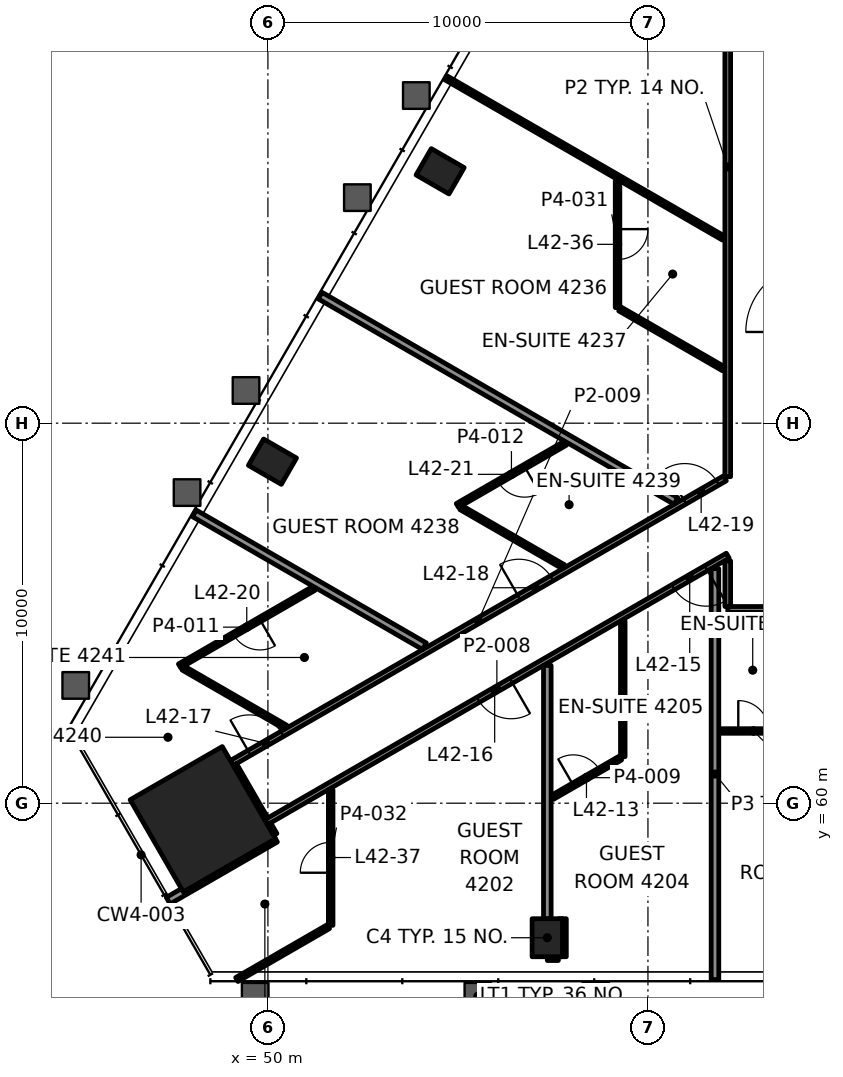
"""IFC4 building model, lengths in metres.
Left out: names, types, materials, properties, quantities, classifications, styles, units other than length and angle.
Written with IfcOpenShell. Run it as: python <this file> out.ifc"""

import sys

from ifc_helpers import new_model, si_unit, direction, frame, frame_2d, origin, origin_2d, place, context, subcontext, project, spatial, rectangle, hollow_rectangle, extrude, element, fill, save


model = new_model("IFC4")
c1 = context("Model", 3, precision=1e-05, world=origin(), true_north=direction((0.0, 1.0)))
c2 = subcontext(c1, "Body", "Model", "MODEL_VIEW")
j1 = project(units=[si_unit("LENGTHUNIT", "METRE"), si_unit("PLANEANGLEUNIT", "RADIAN")], contexts=[c1])
p1 = place(None, origin())
s1 = spatial("IfcSite", under=j1, at=p1, CompositionType="ELEMENT")
p2 = place(p1, origin())
s2 = spatial("IfcBuilding", under=s1, at=p2, CompositionType="ELEMENT")
p3 = place(p2, frame((0.0, 0.0, 183.1)))
s3 = spatial("IfcBuildingStorey", under=s2, at=p3, CompositionType="ELEMENT", Elevation=183.1)
p4 = place(p3, frame((48.287, 59.577, 0.0), z_axis=(0.0, 0.0, 1.0), x_axis=(0.5, -0.866025403784, 0.0)))
e1 = element("IfcColumn", 1, at=p4, inside=s3, PredefinedType="COLUMN", context=c2, shape_type="SweptSolid", body=[
    extrude(rectangle(XDim=2.8, YDim=2.8, at=origin_2d()), origin(), (0.0, 0.0, 1.0), 3.9),
])
for number, where, z_axis, x_axis in (
    (2, (57.352, 56.46, -0.0), (0.0, 0.0, 1.0), (1.0, 0.0, 0.0)),
    (3, (54.532, 76.628, -0.0), (0.0, 0.0, 1.0), (-0.5, -0.866, 0.0)),
    (4, (50.12, 68.987, -0.0), (0.0, 0.0, 1.0), (-0.5, -0.866, 0.0)),
):
    element("IfcColumn", number, at=place(p3, frame(where, z_axis=z_axis, x_axis=x_axis)), inside=s3, PredefinedType="COLUMN", context=c2, shape_type="SweptSolid", body=[
        extrude(hollow_rectangle(XDim=0.8, YDim=1.0, WallThickness=0.05, at=origin_2d()), origin(), (0.0, 0.0, 1.0), 3.9),
    ])
p5 = place(p3, frame((57.352, 55.96, 0.0), z_axis=(0.0, 0.0, 1.0), x_axis=(1.0, 0.0, 0.0)))
e5 = element("IfcWall", 5, at=p5, inside=s3, PredefinedType="PARTITIONING", context=c2, shape_type="SweptSolid", body=[
    extrude(rectangle(XDim=0.29, YDim=0.2, at=frame_2d((0.145, 0.0))), origin(), (0.0, 0.0, 1.0), 3.1),
])
p6 = place(p3, frame((61.864, 61.9, 0.0), z_axis=(0.0, 0.0, 1.0), x_axis=(1.0, 0.0, 0.0)))
e6 = element("IfcWall", 6, at=p6, inside=s3, PredefinedType="PARTITIONING", context=c2, shape_type="SweptSolid", body=[
    extrude(rectangle(XDim=1.825, YDim=0.12, at=frame_2d((0.913, 0.0))), origin(), (0.0, 0.0, 1.0), 3.1),
])
p7 = place(p6, frame((0.513, 0.0, 0.0)))
e7 = element("IfcOpeningElement", 7, at=p7, cuts=e6, PredefinedType="OPENING", context=c2, shape_type="SweptSolid", body=[
    extrude(rectangle(XDim=0.8, YDim=2.1, at=frame_2d((0.4, 1.05))), frame((0.0, 0.07, 0.0), z_axis=(0.0, -1.0, 0.0), x_axis=(1.0, 0.0, 0.0)), (0.0, 0.0, 1.0), 0.14),
])
p8 = place(p3, frame((87.9, 65.1, 0.0), z_axis=(0.0, 0.0, 1.0), x_axis=(-1.0, 0.0, 0.0)))
e8 = element("IfcWall", 8, at=p8, inside=s3, PredefinedType="PARTITIONING", context=c2, shape_type="SweptSolid", body=[
    extrude(rectangle(XDim=25.8, YDim=0.15, at=frame_2d((12.9, 0.0))), origin(), (0.0, 0.0, 1.0), 3.1),
])
p9 = place(p8, frame((2.264, 0.0, 0.0)))
e9 = element("IfcOpeningElement", 9, at=p9, cuts=e8, PredefinedType="OPENING", context=c2, shape_type="SweptSolid", body=[
    extrude(rectangle(XDim=1.0, YDim=2.1, at=frame_2d((0.5, 1.05))), frame((0.0, 0.085, 0.0), z_axis=(0.0, -1.0, 0.0), x_axis=(1.0, 0.0, 0.0)), (0.0, 0.0, 1.0), 0.17),
])
p10 = place(p8, frame((10.244, 0.0, 0.0)))
e10 = element("IfcOpeningElement", 10, at=p10, cuts=e8, PredefinedType="OPENING", context=c2, shape_type="SweptSolid", body=[
    extrude(rectangle(XDim=0.9, YDim=2.1, at=frame_2d((0.45, 1.05))), frame((0.0, 0.085, 0.0), z_axis=(0.0, -1.0, 0.0), x_axis=(1.0, 0.0, 0.0)), (0.0, 0.0, 1.0), 0.17),
])
p11 = place(p8, frame((18.135, 0.0, 0.0)))
e11 = element("IfcOpeningElement", 11, at=p11, cuts=e8, PredefinedType="OPENING", context=c2, shape_type="SweptSolid", body=[
    extrude(rectangle(XDim=1.0, YDim=2.1, at=frame_2d((0.5, 1.05))), frame((0.0, 0.085, 0.0), z_axis=(0.0, -1.0, 0.0), x_axis=(1.0, 0.0, 0.0)), (0.0, 0.0, 1.0), 0.17),
])
p12 = place(p8, frame((21.936, 0.0, 0.0)))
e12 = element("IfcOpeningElement", 12, at=p12, cuts=e8, PredefinedType="OPENING", context=c2, shape_type="SweptSolid", body=[
    extrude(rectangle(XDim=1.0, YDim=2.1, at=frame_2d((0.5, 1.05))), frame((0.0, 0.085, 0.0), z_axis=(0.0, -1.0, 0.0), x_axis=(1.0, 0.0, 0.0)), (0.0, 0.0, 1.0), 0.17),
])
p13 = place(p3, frame((49.182, 55.36, 0.0), z_axis=(0.0, 0.0, 1.0), x_axis=(0.86601027972, 0.500026194733, 0.0)))
e13 = element("IfcWall", 13, at=p13, inside=s3, PredefinedType="PARTITIONING", context=c2, shape_type="SweptSolid", body=[
    extrude(rectangle(XDim=2.783, YDim=0.12, at=frame_2d((1.392, 0.0))), origin(), (0.0, 0.0, 1.0), 3.1),
])
p14 = place(p3, frame((57.487, 60.155, 0.0), z_axis=(0.0, 0.0, 1.0), x_axis=(0.866018462269, 0.500012022864, 0.0)))
e14 = element("IfcWall", 14, at=p14, inside=s3, PredefinedType="PARTITIONING", context=c2, shape_type="SweptSolid", body=[
    extrude(rectangle(XDim=2.068, YDim=0.12, at=frame_2d((1.034, 0.0))), origin(), (0.0, 0.0, 1.0), 3.1),
])
p15 = place(p14, frame((0.634, 0.0, 0.0)))
e15 = element("IfcOpeningElement", 15, at=p15, cuts=e14, PredefinedType="OPENING", context=c2, shape_type="SweptSolid", body=[
    extrude(rectangle(XDim=0.8, YDim=2.1, at=frame_2d((0.4, 1.05))), frame((0.0, 0.07, 0.0), z_axis=(0.0, -1.0, 0.0), x_axis=(1.0, 0.0, 0.0)), (0.0, 0.0, 1.0), 0.14),
])
p16 = place(p3, frame((47.376, 57.435, 0.0), z_axis=(0.0, 0.0, 1.0), x_axis=(0.866035906198, 0.499981808845, 0.0)))
e16 = element("IfcWall", 16, at=p16, inside=s3, PredefinedType="PARTITIONING", context=c2, shape_type="SweptSolid", body=[
    extrude(rectangle(XDim=3.259, YDim=0.2, at=frame_2d((1.63, 0.0))), origin(), (0.0, 0.0, 1.0), 3.1),
])
p17 = place(p3, frame((62.1, 66.513, 0.0), z_axis=(0.0, 0.0, 1.0), x_axis=(-0.866025334814, -0.500000119461, 0.0)))
e17 = element("IfcWall", 17, at=p17, inside=s3, PredefinedType="PARTITIONING", context=c2, shape_type="SweptSolid", body=[
    extrude(rectangle(XDim=14.03, YDim=0.15, at=frame_2d((7.015, 0.0))), origin(), (0.0, 0.0, 1.0), 2.947),
])
p18 = place(p17, frame((0.656, 0.0, 0.0)))
e18 = element("IfcOpeningElement", 18, at=p18, cuts=e17, PredefinedType="OPENING", context=c2, shape_type="SweptSolid", body=[
    extrude(rectangle(XDim=1.0, YDim=2.1, at=frame_2d((0.5, 1.05))), frame((0.0, 0.085, 0.0), z_axis=(0.0, -1.0, 0.0), x_axis=(1.0, 0.0, 0.0)), (0.0, 0.0, 1.0), 0.17),
])
p19 = place(p17, frame((6.582, 0.0, 0.0)))
e19 = element("IfcOpeningElement", 19, at=p19, cuts=e17, PredefinedType="OPENING", context=c2, shape_type="SweptSolid", body=[
    extrude(rectangle(XDim=1.0, YDim=2.1, at=frame_2d((0.5, 1.05))), frame((0.0, 0.085, 0.0), z_axis=(0.0, -1.0, 0.0), x_axis=(1.0, 0.0, 0.0)), (0.0, 0.0, 1.0), 0.17),
])
p20 = place(p3, frame((49.05, 61.057, 0.0), z_axis=(0.0, 0.0, 1.0), x_axis=(0.866027379905, 0.499996577244, 0.0)))
e20 = element("IfcWall", 20, at=p20, inside=s3, PredefinedType="PARTITIONING", context=c2, shape_type="SweptSolid", body=[
    extrude(rectangle(XDim=14.982, YDim=0.15, at=frame_2d((7.491, 0.0))), origin(), (0.0, 0.0, 1.0), 3.1),
])
p21 = place(p20, frame((0.532, 0.0, 0.0)))
e21 = element("IfcOpeningElement", 21, at=p21, cuts=e20, PredefinedType="OPENING", context=c2, shape_type="SweptSolid", body=[
    extrude(rectangle(XDim=1.0, YDim=2.1, at=frame_2d((0.5, 1.05))), frame((0.0, 0.085, 0.0), z_axis=(0.0, -1.0, 0.0), x_axis=(1.0, 0.0, 0.0)), (0.0, 0.0, 1.0), 0.17),
])
p22 = place(p20, frame((8.725, 0.0, 0.0)))
e22 = element("IfcOpeningElement", 22, at=p22, cuts=e20, PredefinedType="OPENING", context=c2, shape_type="SweptSolid", body=[
    extrude(rectangle(XDim=1.0, YDim=2.1, at=frame_2d((0.5, 1.05))), frame((0.0, 0.085, 0.0), z_axis=(0.0, -1.0, 0.0), x_axis=(1.0, 0.0, 0.0)), (0.0, 0.0, 1.0), 0.17),
])
p23 = place(p20, frame((13.76, 0.0, 0.0)))
e23 = element("IfcOpeningElement", 23, at=p23, cuts=e20, PredefinedType="OPENING", context=c2, shape_type="SweptSolid", body=[
    extrude(rectangle(XDim=1.0, YDim=2.1, at=frame_2d((0.5, 1.05))), frame((0.0, 0.085, 0.0), z_axis=(0.0, -1.0, 0.0), x_axis=(1.0, 0.0, 0.0)), (0.0, 0.0, 1.0), 0.17),
])
p24 = place(p3, frame((51.212, 65.654, 0.0), z_axis=(0.0, 0.0, 1.0), x_axis=(-0.866038243659, -0.499977760025, 0.0)))
e24 = element("IfcWall", 24, at=p24, inside=s3, PredefinedType="PARTITIONING", context=c2, shape_type="SweptSolid", body=[
    extrude(rectangle(XDim=4.084, YDim=0.12, at=frame_2d((2.042, 0.0))), origin(), (0.0, 0.0, 1.0), 3.1),
])
p25 = place(p24, frame((1.642, 0.0, 0.0)))
e25 = element("IfcOpeningElement", 25, at=p25, cuts=e24, PredefinedType="OPENING", context=c2, shape_type="SweptSolid", body=[
    extrude(rectangle(XDim=0.8, YDim=2.1, at=frame_2d((0.4, 1.05))), frame((0.0, 0.07, 0.0), z_axis=(0.0, -1.0, 0.0), x_axis=(1.0, 0.0, 0.0)), (0.0, 0.0, 1.0), 0.14),
])
p26 = place(p3, frame((57.83, 69.475, 0.0), z_axis=(0.0, 0.0, 1.0), x_axis=(-0.866038236991, -0.499977771575, 0.0)))
e26 = element("IfcWall", 26, at=p26, inside=s3, PredefinedType="PARTITIONING", context=c2, shape_type="SweptSolid", body=[
    extrude(rectangle(XDim=3.283, YDim=0.12, at=frame_2d((1.642, 0.0))), origin(), (0.0, 0.0, 1.0), 3.1),
])
p27 = place(p26, frame((1.242, 0.0, 0.0)))
e27 = element("IfcOpeningElement", 27, at=p27, cuts=e26, PredefinedType="OPENING", context=c2, shape_type="SweptSolid", body=[
    extrude(rectangle(XDim=0.8, YDim=2.1, at=frame_2d((0.4, 1.05))), frame((0.0, 0.07, 0.0), z_axis=(0.0, -1.0, 0.0), x_axis=(1.0, 0.0, 0.0)), (0.0, 0.0, 1.0), 0.14),
])
p28 = place(p3, frame((62.1, 65.175, 0.0), z_axis=(0.0, 0.0, 1.0), x_axis=(0.0, 1.0, 0.0)))
e28 = element("IfcWall", 28, at=p28, inside=s3, PredefinedType="PARTITIONING", context=c2, shape_type="SweptSolid", body=[
    extrude(rectangle(XDim=1.201, YDim=0.15, at=frame_2d((0.601, 0.0))), origin(), (0.0, 0.0, 1.0), 2.947),
])
p29 = place(p3, frame((62.1, 68.591, 0.0), z_axis=(0.0, 0.0, 1.0), x_axis=(0.0, 1.0, 0.0)))
e29 = element("IfcWall", 29, at=p29, inside=s3, PredefinedType="PARTITIONING", context=c2, shape_type="SweptSolid", body=[
    extrude(rectangle(XDim=16.308, YDim=0.15, at=frame_2d((8.154, 0.0))), origin(), (0.0, 0.0, 1.0), 3.1),
])
p30 = place(p3, frame((61.764, 55.36, 0.0), z_axis=(0.0, 0.0, 1.0), x_axis=(0.0, 1.0, 0.0)))
e30 = element("IfcWall", 30, at=p30, inside=s3, PredefinedType="PARTITIONING", context=c2, shape_type="SweptSolid", body=[
    extrude(rectangle(XDim=10.813, YDim=0.2, at=frame_2d((5.406, 0.0))), origin(), (0.0, 0.0, 1.0), 2.947),
])
p31 = place(p3, frame((59.338, 61.223, 0.0), z_axis=(0.0, 0.0, 1.0), x_axis=(0.0, 1.0, 0.0)))
e31 = element("IfcWall", 31, at=p31, inside=s3, PredefinedType="PARTITIONING", context=c2, shape_type="SweptSolid", body=[
    extrude(rectangle(XDim=3.568, YDim=0.12, at=frame_2d((1.784, 0.0))), origin(), (0.0, 0.0, 1.0), 2.947),
])
p32 = place(p3, frame((59.2, 76.371, 0.0), z_axis=(0.0, 0.0, 1.0), x_axis=(0.0, -1.0, 0.0)))
e32 = element("IfcWall", 32, at=p32, inside=s3, PredefinedType="PARTITIONING", context=c2, shape_type="SweptSolid", body=[
    extrude(rectangle(XDim=3.329, YDim=0.12, at=frame_2d((1.665, 0.0))), origin(), (0.0, 0.0, 1.0), 3.1),
])
p33 = place(p32, frame((1.265, 0.0, 0.0)))
e33 = element("IfcOpeningElement", 33, at=p33, cuts=e32, PredefinedType="OPENING", context=c2, shape_type="SweptSolid", body=[
    extrude(rectangle(XDim=0.8, YDim=2.1, at=frame_2d((0.4, 1.05))), frame((0.0, 0.07, 0.0), z_axis=(0.0, -1.0, 0.0), x_axis=(1.0, 0.0, 0.0)), (0.0, 0.0, 1.0), 0.14),
])
p34 = place(p3, frame((57.752, 55.96, 0.0), z_axis=(0.0, 0.0, 1.0), x_axis=(0.0, 1.0, 0.0)))
e34 = element("IfcWall", 34, at=p34, inside=s3, PredefinedType="PARTITIONING", context=c2, shape_type="SweptSolid", body=[
    extrude(rectangle(XDim=1.0, YDim=0.2, at=frame_2d((0.5, 0.0))), origin(), (0.0, 0.0, 1.0), 3.022),
])
p35 = place(p3, frame((57.352, 56.96, 0.0), z_axis=(0.0, 0.0, 1.0), x_axis=(0.0, 1.0, 0.0)))
e35 = element("IfcWall", 35, at=p35, inside=s3, PredefinedType="PARTITIONING", context=c2, shape_type="SweptSolid", body=[
    extrude(rectangle(XDim=6.666, YDim=0.2, at=frame_2d((3.333, 0.0))), origin(), (0.0, 0.0, 1.0), 3.1),
])
p36 = place(p3, frame((51.652, 56.786, 0.0), z_axis=(0.0, 0.0, 1.0), x_axis=(0.0, 1.0, 0.0)))
e36 = element("IfcWall", 36, at=p36, inside=s3, PredefinedType="PARTITIONING", context=c2, shape_type="SweptSolid", body=[
    extrude(rectangle(XDim=3.568, YDim=0.12, at=frame_2d((1.784, 0.0))), origin(), (0.0, 0.0, 1.0), 3.1),
])
p37 = place(p36, frame((1.384, 0.0, 0.0)))
e37 = element("IfcOpeningElement", 37, at=p37, cuts=e36, PredefinedType="OPENING", context=c2, shape_type="SweptSolid", body=[
    extrude(rectangle(XDim=0.8, YDim=2.1, at=frame_2d((0.4, 1.05))), frame((0.0, 0.07, 0.0), z_axis=(0.0, -1.0, 0.0), x_axis=(1.0, 0.0, 0.0)), (0.0, 0.0, 1.0), 0.14),
])
p38 = place(p3, frame((50.15, 59.152, 0.0), z_axis=(0.0, 0.0, 1.0), x_axis=(-0.499939380126, 0.866060399857, 0.0)))
e38 = element("IfcWall", 38, at=p38, inside=s3, PredefinedType="PARTITIONING", context=c2, shape_type="SweptSolid", body=[
    extrude(rectangle(XDim=0.325, YDim=0.2, at=frame_2d((0.162, 0.0))), origin(), (0.0, 0.0, 1.0), 3.1),
])
p39 = place(p3, frame((61.99, 74.869, 0.0), z_axis=(0.0, 0.0, 1.0), x_axis=(-0.866017924271, 0.500012954673, 0.0)))
e39 = element("IfcWall", 39, at=p39, inside=s3, PredefinedType="PARTITIONING", context=c2, shape_type="SweptSolid", body=[
    extrude(rectangle(XDim=8.439, YDim=0.12, at=frame_2d((4.219, 0.0))), origin(), (0.0, 0.0, 1.0), 3.022),
])
p40 = place(p3, frame((61.99, 71.431, 0.0), z_axis=(0.0, 0.0, 1.0), x_axis=(-0.866028267601, 0.499995039691, 0.0)))
e40 = element("IfcWall", 40, at=p40, inside=s3, PredefinedType="PARTITIONING", context=c2, shape_type="SweptSolid", body=[
    extrude(rectangle(XDim=3.153, YDim=0.12, at=frame_2d((1.576, 0.0))), origin(), (0.0, 0.0, 1.0), 3.1),
])
p41 = place(p3, frame((60.737, 67.951, 0.0), z_axis=(0.0, 0.0, 1.0), x_axis=(-0.866033683985, 0.499985657998, 0.0)))
e41 = element("IfcWall", 41, at=p41, inside=s3, PredefinedType="PARTITIONING", context=c2, shape_type="SweptSolid", body=[
    extrude(rectangle(XDim=10.813, YDim=0.2, at=frame_2d((5.406, 0.0))), origin(), (0.0, 0.0, 1.0), 3.022),
])
p42 = place(p3, frame((57.776, 66.222, 0.0), z_axis=(0.0, 0.0, 1.0), x_axis=(-0.866009247561, 0.500027982357, 0.0)))
e42 = element("IfcWall", 42, at=p42, inside=s3, PredefinedType="PARTITIONING", context=c2, shape_type="SweptSolid", body=[
    extrude(rectangle(XDim=3.113, YDim=0.12, at=frame_2d((1.556, 0.0))), origin(), (0.0, 0.0, 1.0), 3.1),
])
p43 = place(p3, frame((54.119, 64.13, 0.0), z_axis=(0.0, 0.0, 1.0), x_axis=(-0.866016957496, 0.500014629116, 0.0)))
e43 = element("IfcWall", 43, at=p43, inside=s3, PredefinedType="PARTITIONING", context=c2, shape_type="SweptSolid", body=[
    extrude(rectangle(XDim=6.992, YDim=0.2, at=frame_2d((3.496, 0.0))), origin(), (0.0, 0.0, 1.0), 3.1),
])
p44 = place(p3, frame((50.466, 62.001, 0.0), z_axis=(0.0, 0.0, 1.0), x_axis=(-0.866028856698, 0.499994019331, 0.0)))
e44 = element("IfcWall", 44, at=p44, inside=s3, PredefinedType="PARTITIONING", context=c2, shape_type="SweptSolid", body=[
    extrude(rectangle(XDim=3.113, YDim=0.12, at=frame_2d((1.556, 0.0))), origin(), (0.0, 0.0, 1.0), 3.1),
])
p45 = place(p3, frame((49.912, 59.563, 0.0), z_axis=(0.0, 0.0, 1.0), x_axis=(-0.500055614084, 0.865993292597, 0.0)))
e45 = element("IfcWall", 45, at=p45, inside=s3, PredefinedType="PARTITIONING", context=c2, shape_type="SweptSolid", body=[
    extrude(rectangle(XDim=1.649, YDim=0.2, at=frame_2d((0.825, 0.0))), origin(), (0.0, 0.0, 1.0), 2.947),
])
p46 = place(p7, origin())
e46 = element("IfcDoor", 46, at=p46, inside=s3, OperationType="SINGLE_SWING_RIGHT", PredefinedType="DOOR", context=c2, shape_type="SweptSolid", body=[
    extrude(rectangle(XDim=0.8, YDim=2.1, at=frame_2d((0.4, 1.05))), frame((0.0, 0.025, 0.0), z_axis=(0.0, -1.0, 0.0), x_axis=(1.0, 0.0, 0.0)), (0.0, 0.0, 1.0), 0.05),
])
fill(e7, e46)
p47 = place(p15, origin())
e47 = element("IfcDoor", 47, at=p47, inside=s3, OperationType="SINGLE_SWING_RIGHT", PredefinedType="DOOR", context=c2, shape_type="SweptSolid", body=[
    extrude(rectangle(XDim=0.8, YDim=2.1, at=frame_2d((0.4, 1.05))), frame((0.0, 0.025, 0.0), z_axis=(0.0, -1.0, 0.0), x_axis=(1.0, 0.0, 0.0)), (0.0, 0.0, 1.0), 0.05),
])
fill(e15, e47)
p48 = place(p18, origin())
e48 = element("IfcDoor", 48, at=p48, inside=s3, OperationType="SINGLE_SWING_RIGHT", PredefinedType="DOOR", context=c2, shape_type="SweptSolid", body=[
    extrude(rectangle(XDim=1.0, YDim=2.1, at=frame_2d((0.5, 1.05))), frame((0.0, 0.025, 0.0), z_axis=(0.0, -1.0, 0.0), x_axis=(1.0, 0.0, 0.0)), (0.0, 0.0, 1.0), 0.05),
])
fill(e18, e48)
p49 = place(p19, origin())
e49 = element("IfcDoor", 49, at=p49, inside=s3, OperationType="SINGLE_SWING_RIGHT", PredefinedType="DOOR", context=c2, shape_type="SweptSolid", body=[
    extrude(rectangle(XDim=1.0, YDim=2.1, at=frame_2d((0.5, 1.05))), frame((0.0, 0.025, 0.0), z_axis=(0.0, -1.0, 0.0), x_axis=(1.0, 0.0, 0.0)), (0.0, 0.0, 1.0), 0.05),
])
fill(e19, e49)
p50 = place(p21, origin())
e50 = element("IfcDoor", 50, at=p50, inside=s3, OperationType="SINGLE_SWING_LEFT", PredefinedType="DOOR", context=c2, shape_type="SweptSolid", body=[
    extrude(rectangle(XDim=1.0, YDim=2.1, at=frame_2d((0.5, 1.05))), frame((0.0, 0.025, 0.0), z_axis=(0.0, -1.0, 0.0), x_axis=(1.0, 0.0, 0.0)), (0.0, 0.0, 1.0), 0.05),
])
fill(e21, e50)
p51 = place(p22, origin())
e51 = element("IfcDoor", 51, at=p51, inside=s3, OperationType="SINGLE_SWING_LEFT", PredefinedType="DOOR", context=c2, shape_type="SweptSolid", body=[
    extrude(rectangle(XDim=1.0, YDim=2.1, at=frame_2d((0.5, 1.05))), frame((0.0, 0.025, 0.0), z_axis=(0.0, -1.0, 0.0), x_axis=(1.0, 0.0, 0.0)), (0.0, 0.0, 1.0), 0.05),
])
fill(e22, e51)
p52 = place(p23, origin())
e52 = element("IfcDoor", 52, at=p52, inside=s3, OperationType="SINGLE_SWING_LEFT", PredefinedType="DOOR", context=c2, shape_type="SweptSolid", body=[
    extrude(rectangle(XDim=1.0, YDim=2.1, at=frame_2d((0.5, 1.05))), frame((0.0, 0.025, 0.0), z_axis=(0.0, -1.0, 0.0), x_axis=(1.0, 0.0, 0.0)), (0.0, 0.0, 1.0), 0.05),
])
fill(e23, e52)
p53 = place(p25, origin())
e53 = element("IfcDoor", 53, at=p53, inside=s3, OperationType="SINGLE_SWING_LEFT", PredefinedType="DOOR", context=c2, shape_type="SweptSolid", body=[
    extrude(rectangle(XDim=0.8, YDim=2.1, at=frame_2d((0.4, 1.05))), frame((0.0, 0.025, 0.0), z_axis=(0.0, -1.0, 0.0), x_axis=(1.0, 0.0, 0.0)), (0.0, 0.0, 1.0), 0.05),
])
fill(e25, e53)
p54 = place(p27, origin())
e54 = element("IfcDoor", 54, at=p54, inside=s3, OperationType="SINGLE_SWING_LEFT", PredefinedType="DOOR", context=c2, shape_type="SweptSolid", body=[
    extrude(rectangle(XDim=0.8, YDim=2.1, at=frame_2d((0.4, 1.05))), frame((0.0, 0.025, 0.0), z_axis=(0.0, -1.0, 0.0), x_axis=(1.0, 0.0, 0.0)), (0.0, 0.0, 1.0), 0.05),
])
fill(e27, e54)
p55 = place(p33, origin())
e55 = element("IfcDoor", 55, at=p55, inside=s3, OperationType="SINGLE_SWING_LEFT", PredefinedType="DOOR", context=c2, shape_type="SweptSolid", body=[
    extrude(rectangle(XDim=0.8, YDim=2.1, at=frame_2d((0.4, 1.05))), frame((0.0, 0.025, 0.0), z_axis=(0.0, -1.0, 0.0), x_axis=(1.0, 0.0, 0.0)), (0.0, 0.0, 1.0), 0.05),
])
fill(e33, e55)
p56 = place(p37, origin())
e56 = element("IfcDoor", 56, at=p56, inside=s3, OperationType="SINGLE_SWING_RIGHT", PredefinedType="DOOR", context=c2, shape_type="SweptSolid", body=[
    extrude(rectangle(XDim=0.8, YDim=2.1, at=frame_2d((0.4, 1.05))), frame((0.0, 0.025, 0.0), z_axis=(0.0, -1.0, 0.0), x_axis=(1.0, 0.0, 0.0)), (0.0, 0.0, 1.0), 0.05),
])
fill(e37, e56)
p57 = place(p3, origin())
p58 = place(p57, frame((51.471, 55.315, 0.15), z_axis=(0.0, 0.0, 1.0), x_axis=(1.0, 0.0, 0.0)))
p59 = place(p58, origin())
e57 = element("IfcWindow", 57, at=p59, inside=s3, PartitioningType="SINGLE_PANEL", PredefinedType="WINDOW", context=c2, shape_type="SweptSolid", body=[
    extrude(rectangle(XDim=2.866, YDim=3.55, at=frame_2d((1.433, 1.775))), frame((0.0, 0.03, 0.0), z_axis=(0.0, -1.0, 0.0), x_axis=(1.0, 0.0, 0.0)), (0.0, 0.0, 1.0), 0.06),
])
p60 = place(p57, frame((52.04, 74.603, 0.15), z_axis=(0.0, 0.0, 1.0), x_axis=(-0.5, -0.866025, 0.0)))
p61 = place(p60, origin())
e58 = element("IfcWindow", 58, at=p61, inside=s3, PartitioningType="SINGLE_PANEL", PredefinedType="WINDOW", context=c2, shape_type="SweptSolid", body=[
    extrude(rectangle(XDim=2.866, YDim=3.55, at=frame_2d((1.433, 1.775))), frame((0.0, 0.03, 0.0), z_axis=(0.0, -1.0, 0.0), x_axis=(1.0, 0.0, 0.0)), (0.0, 0.0, 1.0), 0.06),
])
save(model, sys.argv[1])
